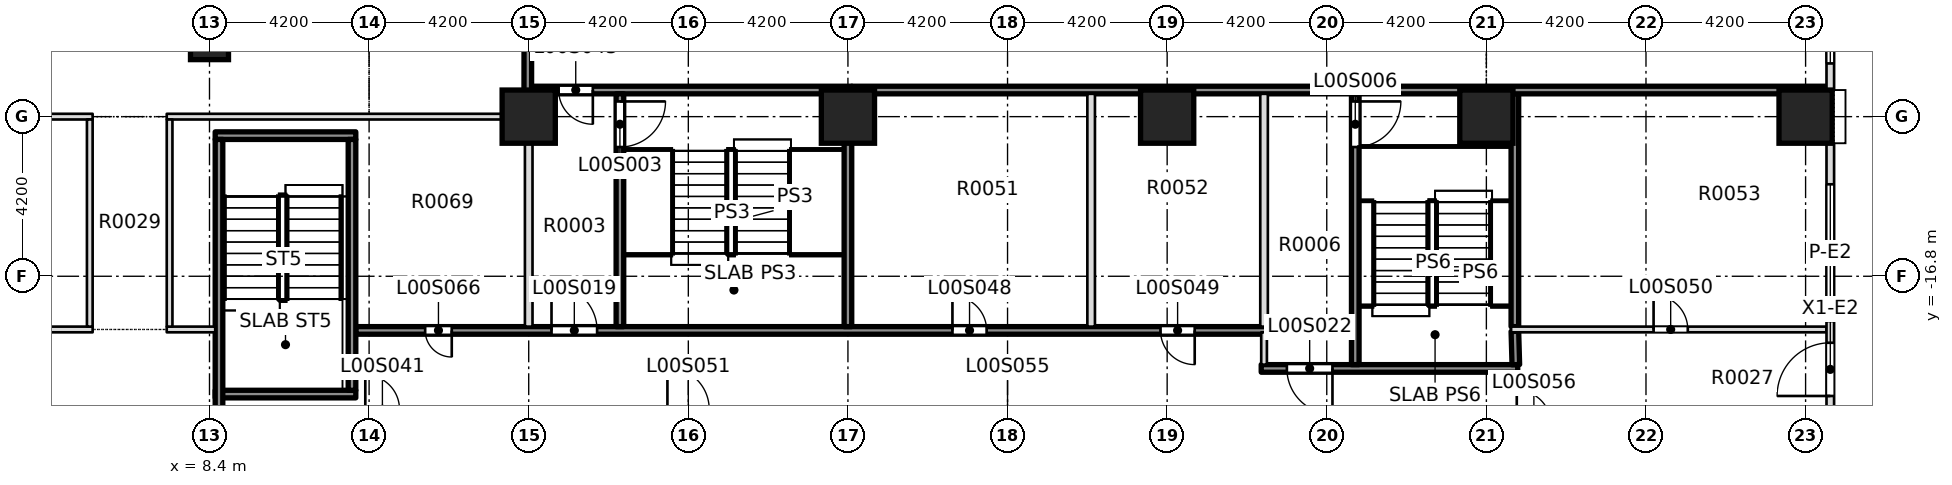
"""IFC4 building model, lengths in metres.
Left out: names, types, materials, properties, quantities, classifications, styles, units other than length and angle.
Written with IfcOpenShell. Run it as: python <this file> out.ifc"""

import sys

from ifc_helpers import new_model, si_unit, direction, frame, frame_2d, origin, origin_2d, place, context, subcontext, project, spatial, rectangle, extrude, element, fill, save


model = new_model("IFC4")
c1 = context("Model", 3, precision=1e-05, world=origin(), true_north=direction((0.0, 1.0)))
c2 = subcontext(c1, "Body", "Model", "MODEL_VIEW")
j1 = project(units=[si_unit("LENGTHUNIT", "METRE"), si_unit("PLANEANGLEUNIT", "RADIAN")], contexts=[c1])
p1 = place(None, origin())
s1 = spatial("IfcSite", under=j1, at=p1, CompositionType="ELEMENT")
p2 = place(p1, origin())
s2 = spatial("IfcBuilding", under=s1, at=p2, CompositionType="ELEMENT")
p3 = place(p2, origin())
s3 = spatial("IfcBuildingStorey", under=s2, at=p3, CompositionType="ELEMENT", Elevation=0.0)
for number, where, z_axis, x_axis in (
    (1, (16.8, -12.6, -0.45), (0.0, 0.0, 1.0), (1.0, 0.0, 0.0)),
    (2, (25.2, -12.6, -0.45), (0.0, 0.0, 1.0), (1.0, 0.0, 0.0)),
):
    element("IfcColumn", number, at=place(p3, frame(where, z_axis=z_axis, x_axis=x_axis)), inside=s3, PredefinedType="COLUMN", context=c2, shape_type="SweptSolid", body=[
        extrude(rectangle(XDim=1.4, YDim=1.4, at=origin_2d()), origin(), (0.0, 0.0, 1.0), 7.55),
    ])
p4 = place(p3, frame((8.4, -10.6, -0.45), z_axis=(0.0, 0.0, 1.0), x_axis=(1.0, 0.0, 0.0)))
e3 = element("IfcColumn", 3, at=p4, inside=s3, PredefinedType="COLUMN", context=c2, shape_type="SweptSolid", body=[
    extrude(rectangle(XDim=1.0, YDim=1.0, at=origin_2d()), origin(), (0.0, 0.0, 1.0), 7.55),
])
for number, where, z_axis, x_axis in (
    (4, (33.6, -12.6, 0.0), (0.0, 0.0, 1.0), (1.0, 0.0, 0.0)),
    (5, (42.0, -12.6, 0.0), (0.0, 0.0, 1.0), (1.0, 0.0, 0.0)),
    (6, (50.4, -12.6, 0.0), (0.0, 0.0, 1.0), (1.0, 0.0, 0.0)),
):
    element("IfcColumn", number, at=place(p3, frame(where, z_axis=z_axis, x_axis=x_axis)), inside=s3, PredefinedType="COLUMN", context=c2, shape_type="SweptSolid", body=[
        extrude(rectangle(XDim=1.4, YDim=1.4, at=origin_2d()), origin(), (0.0, 0.0, 1.0), 7.5),
    ])
p5 = place(p3, frame((36.075, -19.225, 0.0), z_axis=(0.0, 0.0, 1.0), x_axis=(1.0, 0.0, 0.0)))
e7 = element("IfcWall", 7, at=p5, inside=s3, PredefinedType="SOLIDWALL", context=c2, shape_type="SweptSolid", body=[
    extrude(rectangle(XDim=6.75, YDim=0.2, at=frame_2d((3.375, 0.0))), origin(), (0.0, 0.0, 1.0), 7.1),
])
p6 = place(p5, frame((0.675, 0.0, 0.0)))
e8 = element("IfcOpeningElement", 8, at=p6, cuts=e7, PredefinedType="OPENING", context=c2, shape_type="SweptSolid", body=[
    extrude(rectangle(XDim=1.2, YDim=2.1, at=frame_2d((0.6, 1.05))), frame((0.0, 0.11, 0.0), z_axis=(0.0, -1.0, 0.0), x_axis=(1.0, 0.0, 0.0)), (0.0, 0.0, 1.0), 0.22),
])
p7 = place(p3, frame((1.85, -18.2, 0.0), z_axis=(0.0, 0.0, 1.0), x_axis=(1.0, 0.0, 0.0)))
e9 = element("IfcWall", 9, at=p7, inside=s3, PredefinedType="PARTITIONING", context=c2, shape_type="SweptSolid", body=[
    extrude(rectangle(XDim=3.475, YDim=0.15, at=frame_2d((1.737, 0.0))), origin(), (0.0, 0.0, 1.0), 7.1),
])
p8 = place(p3, frame((7.275, -18.2, 0.0), z_axis=(0.0, 0.0, 1.0), x_axis=(1.0, 0.0, 0.0)))
e10 = element("IfcWall", 10, at=p8, inside=s3, PredefinedType="PARTITIONING", context=c2, shape_type="SweptSolid", body=[
    extrude(rectangle(XDim=1.275, YDim=0.15, at=frame_2d((0.638, 0.0))), origin(), (0.0, 0.0, 1.0), 7.1),
])
p9 = place(p3, frame((12.25, -18.225, 0.0), z_axis=(0.0, 0.0, 1.0), x_axis=(1.0, 0.0, 0.0)))
e11 = element("IfcWall", 11, at=p9, inside=s3, PredefinedType="SOLIDWALL", context=c2, shape_type="SweptSolid", body=[
    extrude(rectangle(XDim=24.0, YDim=0.2, at=frame_2d((12.0, 0.0))), origin(), (0.0, 0.0, 1.0), 7.1),
])
p10 = place(p9, frame((5.15, 0.0, 0.0)))
e12 = element("IfcOpeningElement", 12, at=p10, cuts=e11, PredefinedType="OPENING", context=c2, shape_type="SweptSolid", body=[
    extrude(rectangle(XDim=1.2, YDim=2.1, at=frame_2d((0.6, 1.05))), frame((0.0, 0.11, 0.0), z_axis=(0.0, -1.0, 0.0), x_axis=(1.0, 0.0, 0.0)), (0.0, 0.0, 1.0), 0.22),
])
p11 = place(p9, frame((15.7, 0.0, 0.0)))
e13 = element("IfcOpeningElement", 13, at=p11, cuts=e11, PredefinedType="OPENING", context=c2, shape_type="SweptSolid", body=[
    extrude(rectangle(XDim=0.9, YDim=2.1, at=frame_2d((0.45, 1.05))), frame((0.0, 0.11, 0.0), z_axis=(0.0, -1.0, 0.0), x_axis=(1.0, 0.0, 0.0)), (0.0, 0.0, 1.0), 0.22),
])
p12 = place(p9, frame((21.175, 0.0, 0.0)))
e14 = element("IfcOpeningElement", 14, at=p12, cuts=e11, PredefinedType="OPENING", context=c2, shape_type="SweptSolid", body=[
    extrude(rectangle(XDim=0.9, YDim=2.1, at=frame_2d((0.45, 1.05))), frame((0.0, 0.11, 0.0), z_axis=(0.0, -1.0, 0.0), x_axis=(1.0, 0.0, 0.0)), (0.0, 0.0, 1.0), 0.22),
])
p13 = place(p9, frame((1.825, 0.0, 0.0)))
e15 = element("IfcOpeningElement", 15, at=p13, cuts=e11, PredefinedType="OPENING", context=c2, shape_type="SweptSolid", body=[
    extrude(rectangle(XDim=0.7, YDim=2.1, at=frame_2d((0.35, 1.05))), frame((0.0, 0.11, 0.0), z_axis=(0.0, -1.0, 0.0), x_axis=(1.0, 0.0, 0.0)), (0.0, 0.0, 1.0), 0.22),
])
p14 = place(p3, frame((42.65, -18.2, 0.0), z_axis=(0.0, 0.0, 1.0), x_axis=(1.0, 0.0, 0.0)))
e16 = element("IfcWall", 16, at=p14, inside=s3, PredefinedType="PARTITIONING", context=c2, shape_type="SweptSolid", body=[
    extrude(rectangle(XDim=8.3, YDim=0.15, at=frame_2d((4.15, 0.0))), origin(), (0.0, 0.0, 1.0), 7.1),
])
p15 = place(p14, frame((3.75, 0.0, 0.0)))
e17 = element("IfcOpeningElement", 17, at=p15, cuts=e16, PredefinedType="OPENING", context=c2, shape_type="SweptSolid", body=[
    extrude(rectangle(XDim=0.9, YDim=2.1, at=frame_2d((0.45, 1.05))), frame((0.0, 0.085, 0.0), z_axis=(0.0, -1.0, 0.0), x_axis=(1.0, 0.0, 0.0)), (0.0, 0.0, 1.0), 0.17),
])
p16 = place(p3, frame((-5.325, -12.6, 0.0), z_axis=(0.0, 0.0, 1.0), x_axis=(1.0, 0.0, 0.0)))
e18 = element("IfcWall", 18, at=p16, inside=s3, PredefinedType="PARTITIONING", context=c2, shape_type="SweptSolid", body=[
    extrude(rectangle(XDim=10.65, YDim=0.15, at=frame_2d((5.325, 0.0))), origin(), (0.0, 0.0, 1.0), 7.1),
])
p17 = place(p3, frame((7.275, -12.6, 0.0), z_axis=(0.0, 0.0, 1.0), x_axis=(1.0, 0.0, 0.0)))
e19 = element("IfcWall", 19, at=p17, inside=s3, PredefinedType="PARTITIONING", context=c2, shape_type="SweptSolid", body=[
    extrude(rectangle(XDim=9.625, YDim=0.15, at=frame_2d((4.812, 0.0))), origin(), (0.0, 0.0, 1.0), 7.1),
])
p18 = place(p3, frame((16.875, -11.9, 0.0), z_axis=(0.0, 0.0, 1.0), x_axis=(1.0, 0.0, 0.0)))
e20 = element("IfcWall", 20, at=p18, inside=s3, PredefinedType="SOLIDWALL", context=c2, shape_type="SweptSolid", body=[
    extrude(rectangle(XDim=8.425, YDim=0.2, at=frame_2d((4.212, 0.0))), origin(), (0.0, 0.0, 1.0), 7.1),
])
p19 = place(p18, frame((0.712, 0.0, 0.0)))
e21 = element("IfcOpeningElement", 21, at=p19, cuts=e20, PredefinedType="OPENING", context=c2, shape_type="SweptSolid", body=[
    extrude(rectangle(XDim=0.9, YDim=2.1, at=frame_2d((0.45, 1.05))), frame((0.0, 0.11, 0.0), z_axis=(0.0, -1.0, 0.0), x_axis=(1.0, 0.0, 0.0)), (0.0, 0.0, 1.0), 0.22),
])
for number, where, z_axis, x_axis in (
    (22, (5.25, -18.125, 0.0), (0.0, 0.0, 1.0), (0.0, 1.0, 0.0)),
    (23, (7.35, -18.125, 0.0), (0.0, 0.0, 1.0), (0.0, 1.0, 0.0)),
):
    element("IfcWall", number, at=place(p3, frame(where, z_axis=z_axis, x_axis=x_axis)), inside=s3, PredefinedType="PARTITIONING", context=c2, shape_type="SweptSolid", body=[
        extrude(rectangle(XDim=5.45, YDim=0.15, at=frame_2d((2.725, 0.0))), origin(), (0.0, 0.0, 1.0), 7.1),
    ])
p20 = place(p3, frame((16.8, -18.125, 0.0), z_axis=(0.0, 0.0, 1.0), x_axis=(0.0, 1.0, 0.0)))
e24 = element("IfcWall", 24, at=p20, inside=s3, PredefinedType="PARTITIONING", context=c2, shape_type="SweptSolid", body=[
    extrude(rectangle(XDim=5.45, YDim=0.2, at=frame_2d((2.725, 0.0))), origin(), (0.0, 0.0, 1.0), 7.1),
])
p21 = place(p3, frame((16.775, -12.525, 0.0), z_axis=(0.0, 0.0, 1.0), x_axis=(0.000893357267, 0.999999600956, 0.0)))
e25 = element("IfcWall", 25, at=p21, inside=s3, PredefinedType="SOLIDWALL", context=c2, shape_type="SweptSolid", body=[
    extrude(rectangle(XDim=27.875, YDim=0.2, at=frame_2d((13.938, 0.0))), origin(), (0.0, 0.0, 1.0), 7.1),
])
p22 = place(p21, frame((16.225, 0.0, 0.0)))
e26 = element("IfcOpeningElement", 26, at=p22, cuts=e25, PredefinedType="OPENING", context=c2, shape_type="SweptSolid", body=[
    extrude(rectangle(XDim=1.5, YDim=2.1, at=frame_2d((0.75, 1.05))), frame((0.0, 0.11, 0.0), z_axis=(0.0, -1.0, 0.0), x_axis=(1.0, 0.0, 0.0)), (0.0, 0.0, 1.0), 0.22),
])
p23 = place(p21, frame((26.062, 0.0, 0.0)))
e27 = element("IfcOpeningElement", 27, at=p23, cuts=e25, PredefinedType="OPENING", context=c2, shape_type="SweptSolid", body=[
    extrude(rectangle(XDim=0.9, YDim=2.1, at=frame_2d((0.45, 1.05))), frame((0.0, 0.11, 0.0), z_axis=(0.0, -1.0, 0.0), x_axis=(1.0, 0.0, 0.0)), (0.0, 0.0, 1.0), 0.22),
])
p24 = place(p3, frame((19.2, -18.125, 0.0), z_axis=(0.0, 0.0, 1.0), x_axis=(0.0, 1.0, 0.0)))
e28 = element("IfcWall", 28, at=p24, inside=s3, PredefinedType="SOLIDWALL", context=c2, shape_type="SweptSolid", body=[
    extrude(rectangle(XDim=6.125, YDim=0.2, at=frame_2d((3.062, 0.0))), origin(), (0.0, 0.0, 1.0), 7.1),
])
p25 = place(p24, frame((4.725, 0.0, 0.0)))
e29 = element("IfcOpeningElement", 29, at=p25, cuts=e28, PredefinedType="OPENING", context=c2, shape_type="SweptSolid", body=[
    extrude(rectangle(XDim=1.2, YDim=2.1, at=frame_2d((0.6, 1.05))), frame((0.0, 0.11, 0.0), z_axis=(0.0, -1.0, 0.0), x_axis=(1.0, 0.0, 0.0)), (0.0, 0.0, 1.0), 0.22),
])
p26 = place(p3, frame((25.2, -18.125, 0.0), z_axis=(0.0, 0.0, 1.0), x_axis=(0.0, 1.0, 0.0)))
e30 = element("IfcWall", 30, at=p26, inside=s3, PredefinedType="SOLIDWALL", context=c2, shape_type="SweptSolid", body=[
    extrude(rectangle(XDim=6.125, YDim=0.2, at=frame_2d((3.062, 0.0))), origin(), (0.0, 0.0, 1.0), 7.1),
])
p27 = place(p3, frame((31.6, -18.125, 0.0), z_axis=(0.0, 0.0, 1.0), x_axis=(0.0, 1.0, 0.0)))
e31 = element("IfcWall", 31, at=p27, inside=s3, PredefinedType="PARTITIONING", context=c2, shape_type="SweptSolid", body=[
    extrude(rectangle(XDim=6.125, YDim=0.2, at=frame_2d((3.062, 0.0))), origin(), (0.0, 0.0, 1.0), 7.1),
])
p28 = place(p3, frame((36.15, -19.125, 0.0), z_axis=(0.0, 0.0, 1.0), x_axis=(0.0, 1.0, 0.0)))
e32 = element("IfcWall", 32, at=p28, inside=s3, PredefinedType="PARTITIONING", context=c2, shape_type="SweptSolid", body=[
    extrude(rectangle(XDim=0.85, YDim=0.15, at=frame_2d((0.425, 0.0))), origin(), (0.0, 0.0, 1.0), 7.1),
])
p29 = place(p3, frame((36.15, -18.125, 0.0), z_axis=(0.0, 0.0, 1.0), x_axis=(0.0, 1.0, 0.0)))
e33 = element("IfcWall", 33, at=p29, inside=s3, PredefinedType="PARTITIONING", context=c2, shape_type="SweptSolid", body=[
    extrude(rectangle(XDim=6.125, YDim=0.2, at=frame_2d((3.062, 0.0))), origin(), (0.0, 0.0, 1.0), 7.1),
])
p30 = place(p3, frame((38.55, -19.125, 0.0), z_axis=(0.0, 0.0, 1.0), x_axis=(0.0, 1.0, 0.0)))
e34 = element("IfcWall", 34, at=p30, inside=s3, PredefinedType="SOLIDWALL", context=c2, shape_type="SweptSolid", body=[
    extrude(rectangle(XDim=7.125, YDim=0.2, at=frame_2d((3.562, 0.0))), origin(), (0.0, 0.0, 1.0), 7.1),
])
p31 = place(p30, frame((5.725, 0.0, 0.0)))
e35 = element("IfcOpeningElement", 35, at=p31, cuts=e34, PredefinedType="OPENING", context=c2, shape_type="SweptSolid", body=[
    extrude(rectangle(XDim=1.2, YDim=2.1, at=frame_2d((0.6, 1.05))), frame((0.0, 0.11, 0.0), z_axis=(0.0, -1.0, 0.0), x_axis=(1.0, 0.0, 0.0)), (0.0, 0.0, 1.0), 0.22),
])
p32 = place(p3, frame((42.775, -19.125, 0.0), z_axis=(0.0, 0.0, 1.0), x_axis=(-0.028448302746, 0.99959526513, 0.0)))
e36 = element("IfcWall", 36, at=p32, inside=s3, PredefinedType="SOLIDWALL", context=c2, shape_type="SweptSolid", body=[
    extrude(rectangle(XDim=0.875, YDim=0.2, at=frame_2d((0.438, 0.0))), origin(), (0.0, 0.0, 1.0), 7.1),
])
p33 = place(p3, frame((51.05, -13.3, 0.0), z_axis=(0.0, 0.0, 1.0), x_axis=(0.0, -1.0, 0.0)))
e37 = element("IfcWall", 37, at=p33, inside=s3, PredefinedType="STANDARD", context=c2, shape_type="SweptSolid", body=[
    extrude(rectangle(XDim=7.0, YDim=0.2, at=frame_2d((3.5, 0.0))), origin(), (0.0, 0.0, 1.0), 7.1),
])
p34 = place(p33, frame((1.08, 0.0, 0.3)))
e38 = element("IfcOpeningElement", 38, at=p34, cuts=e37, PredefinedType="OPENING", context=c2, shape_type="SweptSolid", body=[
    extrude(rectangle(XDim=3.6, YDim=4.2, at=frame_2d((1.8, 2.1))), frame((0.0, 0.11, 0.0), z_axis=(0.0, -1.0, 0.0), x_axis=(1.0, 0.0, 0.0)), (0.0, 0.0, 1.0), 0.22),
])
p35 = place(p33, frame((5.25, 0.0, 0.0)))
e39 = element("IfcOpeningElement", 39, at=p35, cuts=e37, PredefinedType="OPENING", context=c2, shape_type="SweptSolid", body=[
    extrude(rectangle(XDim=1.4, YDim=2.1, at=frame_2d((0.7, 1.05))), frame((0.0, 0.11, 0.0), z_axis=(0.0, -1.0, 0.0), x_axis=(1.0, 0.0, 0.0)), (0.0, 0.0, 1.0), 0.22),
])
p36 = place(p3, frame((51.05, -4.9, 0.0), z_axis=(0.0, 0.0, 1.0), x_axis=(0.0, -1.0, 0.0)))
e40 = element("IfcWall", 40, at=p36, inside=s3, PredefinedType="STANDARD", context=c2, shape_type="SweptSolid", body=[
    extrude(rectangle(XDim=7.0, YDim=0.2, at=frame_2d((3.5, 0.0))), origin(), (0.0, 0.0, 1.0), 7.1),
])
p37 = place(p36, frame((4.5, 0.0, 0.3)))
e41 = element("IfcOpeningElement", 41, at=p37, cuts=e40, PredefinedType="OPENING", context=c2, shape_type="SweptSolid", body=[
    extrude(rectangle(XDim=1.8, YDim=4.2, at=frame_2d((0.9, 2.1))), frame((0.0, 0.11, 0.0), z_axis=(0.0, -1.0, 0.0), x_axis=(1.0, 0.0, 0.0)), (0.0, 0.0, 1.0), 0.22),
])
p38 = place(p36, frame((2.6, 0.0, 0.0)))
e42 = element("IfcOpeningElement", 42, at=p38, cuts=e40, PredefinedType="OPENING", context=c2, shape_type="SweptSolid", body=[
    extrude(rectangle(XDim=1.8, YDim=2.4, at=frame_2d((0.9, 1.2))), frame((0.0, 0.11, 0.0), z_axis=(0.0, -1.0, 0.0), x_axis=(1.0, 0.0, 0.0)), (0.0, 0.0, 1.0), 0.22),
])
p39 = place(p36, frame((0.7, 0.0, 0.3)))
e43 = element("IfcOpeningElement", 43, at=p39, cuts=e40, PredefinedType="OPENING", context=c2, shape_type="SweptSolid", body=[
    extrude(rectangle(XDim=1.8, YDim=4.2, at=frame_2d((0.9, 2.1))), frame((0.0, 0.11, 0.0), z_axis=(0.0, -1.0, 0.0), x_axis=(1.0, 0.0, 0.0)), (0.0, 0.0, 1.0), 0.22),
])
for number, where, z_axis, x_axis in (
    (44, (8.55, -19.9, 0.0), (0.0, 0.0, 1.0), (1.0, 0.0, 0.0)),
    (45, (8.55, -13.1, 0.0), (0.0, 0.0, 1.0), (1.0, 0.0, 0.0)),
):
    element("IfcWall", number, at=place(p3, frame(where, z_axis=z_axis, x_axis=x_axis)), inside=s3, PredefinedType="SOLIDWALL", context=c2, shape_type="SweptSolid", body=[
        extrude(rectangle(XDim=3.7, YDim=0.2, at=frame_2d((1.85, 0.0))), origin(), (0.0, 0.0, 1.0), 7.1),
    ])
p40 = place(p3, frame((8.65, -20.3, 0.0), z_axis=(0.0, 0.0, 1.0), x_axis=(0.0, 1.0, 0.0)))
e46 = element("IfcWall", 46, at=p40, inside=s3, PredefinedType="SOLIDWALL", context=c2, shape_type="SweptSolid", body=[
    extrude(rectangle(XDim=7.1, YDim=0.2, at=frame_2d((3.55, 0.0))), origin(), (0.0, 0.0, 1.0), 7.1),
])
p41 = place(p3, frame((12.15, -19.8, 0.0), z_axis=(0.0, 0.0, 1.0), x_axis=(0.0, 1.0, 0.0)))
e47 = element("IfcWall", 47, at=p41, inside=s3, PredefinedType="SOLIDWALL", context=c2, shape_type="SweptSolid", body=[
    extrude(rectangle(XDim=6.6, YDim=0.2, at=frame_2d((3.3, 0.0))), origin(), (0.0, 0.0, 1.0), 7.1),
])
p42 = place(p3, frame((42.75, -18.125, 0.0), z_axis=(0.0, 0.0, 1.0), x_axis=(0.0, 1.0, 0.0)))
e48 = element("IfcWall", 48, at=p42, inside=s3, PredefinedType="SOLIDWALL", context=c2, shape_type="SweptSolid", body=[
    extrude(rectangle(XDim=6.125, YDim=0.2, at=frame_2d((3.062, 0.0))), origin(), (0.0, 0.0, 1.0), 7.1),
])
p43 = place(p3, frame((25.3, -11.9, 0.0), z_axis=(0.0, 0.0, 1.0), x_axis=(1.0, 0.0, 0.0)))
e49 = element("IfcWall", 49, at=p43, inside=s3, PredefinedType="SOLIDWALL", context=c2, shape_type="SweptSolid", body=[
    extrude(rectangle(XDim=25.65, YDim=0.2, at=frame_2d((12.825, 0.0))), origin(), (0.0, 0.0, 1.0), 7.1),
])
p44 = place(p25, origin())
e50 = element("IfcDoor", 50, at=p44, inside=s3, OperationType="DOUBLE_DOOR_SINGLE_SWING", PredefinedType="DOOR", context=c2, shape_type="SweptSolid", body=[
    extrude(rectangle(XDim=1.2, YDim=2.1, at=frame_2d((0.6, 1.05))), frame((0.0, 0.025, 0.0), z_axis=(0.0, -1.0, 0.0), x_axis=(1.0, 0.0, 0.0)), (0.0, 0.0, 1.0), 0.05),
])
fill(e29, e50)
p45 = place(p31, origin())
e51 = element("IfcDoor", 51, at=p45, inside=s3, OperationType="DOUBLE_DOOR_SINGLE_SWING", PredefinedType="DOOR", context=c2, shape_type="SweptSolid", body=[
    extrude(rectangle(XDim=1.2, YDim=2.1, at=frame_2d((0.6, 1.05))), frame((0.0, 0.025, 0.0), z_axis=(0.0, -1.0, 0.0), x_axis=(1.0, 0.0, 0.0)), (0.0, 0.0, 1.0), 0.05),
])
fill(e35, e51)
p46 = place(p10, origin())
e52 = element("IfcDoor", 52, at=p46, inside=s3, OperationType="SINGLE_SWING_LEFT", PredefinedType="DOOR", context=c2, shape_type="SweptSolid", body=[
    extrude(rectangle(XDim=1.2, YDim=2.1, at=frame_2d((0.6, 1.05))), frame((0.0, 0.025, 0.0), z_axis=(0.0, -1.0, 0.0), x_axis=(1.0, 0.0, 0.0)), (0.0, 0.0, 1.0), 0.05),
])
fill(e12, e52)
p47 = place(p6, origin())
e53 = element("IfcDoor", 53, at=p47, inside=s3, OperationType="SINGLE_SWING_LEFT", PredefinedType="DOOR", context=c2, shape_type="SweptSolid", body=[
    extrude(rectangle(XDim=1.2, YDim=2.1, at=frame_2d((0.6, 1.05))), frame((0.0, 0.025, 0.0), z_axis=(0.0, -1.0, 0.0), x_axis=(1.0, 0.0, 0.0)), (0.0, 0.0, 1.0), 0.05),
])
fill(e8, e53)
p48 = place(p19, origin())
e54 = element("IfcDoor", 54, at=p48, inside=s3, OperationType="SINGLE_SWING_LEFT", PredefinedType="DOOR", context=c2, shape_type="SweptSolid", body=[
    extrude(rectangle(XDim=0.9, YDim=2.1, at=frame_2d((0.45, 1.05))), frame((0.0, 0.025, 0.0), z_axis=(0.0, -1.0, 0.0), x_axis=(1.0, 0.0, 0.0)), (0.0, 0.0, 1.0), 0.05),
])
fill(e21, e54)
p49 = place(p11, origin())
e55 = element("IfcDoor", 55, at=p49, inside=s3, OperationType="SINGLE_SWING_LEFT", PredefinedType="DOOR", context=c2, shape_type="SweptSolid", body=[
    extrude(rectangle(XDim=0.9, YDim=2.1, at=frame_2d((0.45, 1.05))), frame((0.0, 0.025, 0.0), z_axis=(0.0, -1.0, 0.0), x_axis=(1.0, 0.0, 0.0)), (0.0, 0.0, 1.0), 0.05),
])
fill(e13, e55)
p50 = place(p12, origin())
e56 = element("IfcDoor", 56, at=p50, inside=s3, OperationType="SINGLE_SWING_LEFT", PredefinedType="DOOR", context=c2, shape_type="SweptSolid", body=[
    extrude(rectangle(XDim=0.9, YDim=2.1, at=frame_2d((0.45, 1.05))), frame((0.0, 0.025, 0.0), z_axis=(0.0, -1.0, 0.0), x_axis=(1.0, 0.0, 0.0)), (0.0, 0.0, 1.0), 0.05),
])
fill(e14, e56)
p51 = place(p15, origin())
e57 = element("IfcDoor", 57, at=p51, inside=s3, OperationType="SINGLE_SWING_LEFT", PredefinedType="DOOR", context=c2, shape_type="SweptSolid", body=[
    extrude(rectangle(XDim=0.9, YDim=2.1, at=frame_2d((0.45, 1.05))), frame((0.0, 0.025, 0.0), z_axis=(0.0, -1.0, 0.0), x_axis=(1.0, 0.0, 0.0)), (0.0, 0.0, 1.0), 0.05),
])
fill(e17, e57)
p52 = place(p13, origin())
e58 = element("IfcDoor", 58, at=p52, inside=s3, OperationType="SINGLE_SWING_LEFT", PredefinedType="DOOR", context=c2, shape_type="SweptSolid", body=[
    extrude(rectangle(XDim=0.7, YDim=2.1, at=frame_2d((0.35, 1.05))), frame((0.0, 0.025, 0.0), z_axis=(0.0, -1.0, 0.0), x_axis=(1.0, 0.0, 0.0)), (0.0, 0.0, 1.0), 0.05),
])
fill(e15, e58)
p53 = place(p34, origin())
e59 = element("IfcWindow", 59, at=p53, inside=s3, PartitioningType="SINGLE_PANEL", PredefinedType="WINDOW", context=c2, shape_type="SweptSolid", body=[
    extrude(rectangle(XDim=3.6, YDim=4.2, at=frame_2d((1.8, 2.1))), frame((0.0, 0.03, 0.0), z_axis=(0.0, -1.0, 0.0), x_axis=(1.0, 0.0, 0.0)), (0.0, 0.0, 1.0), 0.06),
])
fill(e38, e59)
p54 = place(p37, origin())
e60 = element("IfcWindow", 60, at=p54, inside=s3, PartitioningType="SINGLE_PANEL", PredefinedType="WINDOW", context=c2, shape_type="SweptSolid", body=[
    extrude(rectangle(XDim=1.8, YDim=4.2, at=frame_2d((0.9, 2.1))), frame((0.0, 0.03, 0.0), z_axis=(0.0, -1.0, 0.0), x_axis=(1.0, 0.0, 0.0)), (0.0, 0.0, 1.0), 0.06),
])
fill(e41, e60)
p55 = place(p35, origin())
e61 = element("IfcDoor", 61, at=p55, inside=s3, OperationType="SINGLE_SWING_LEFT", PredefinedType="DOOR", context=c2, shape_type="SweptSolid", body=[
    extrude(rectangle(XDim=1.4, YDim=2.1, at=frame_2d((0.7, 1.05))), frame((0.0, 0.025, 0.0), z_axis=(0.0, -1.0, 0.0), x_axis=(1.0, 0.0, 0.0)), (0.0, 0.0, 1.0), 0.05),
])
fill(e39, e61)
save(model, sys.argv[1])
